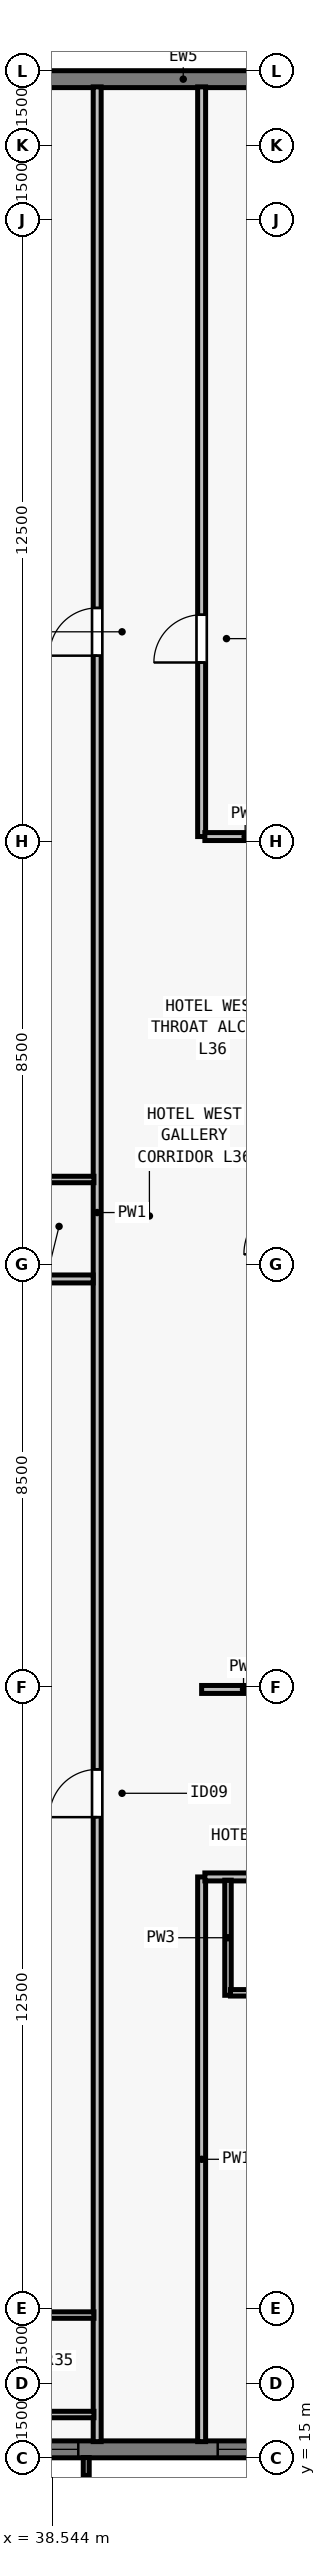
"""IFC4 building model, lengths in metres.
Left out: names, types, materials, properties, quantities, classifications, styles, units other than length and angle.
Written with IfcOpenShell. Run it as: python <this file> out.ifc"""

import sys

from ifc_helpers import new_model, si_unit, direction, frame, frame_2d, origin, place, context, subcontext, project, spatial, rectangle, extrude, element, fill, save


model = new_model("IFC4")
c1 = context("Model", 3, precision=1e-05, world=origin(), true_north=direction((0.0, 1.0)))
c2 = subcontext(c1, "Body", "Model", "MODEL_VIEW")
j1 = project(units=[si_unit("LENGTHUNIT", "METRE"), si_unit("PLANEANGLEUNIT", "RADIAN")], contexts=[c1])
p1 = place(None, origin())
s1 = spatial("IfcSite", under=j1, at=p1, CompositionType="ELEMENT")
p2 = place(p1, origin())
s2 = spatial("IfcBuilding", under=s1, at=p2, CompositionType="ELEMENT")
p3 = place(p2, frame((0.0, 0.0, 134.0)))
s3 = spatial("IfcBuildingStorey", under=s2, at=p3, CompositionType="ELEMENT", Elevation=134.0)
p4 = place(p3, frame((32.0, 62.83, 0.0), z_axis=(0.0, 0.0, 1.0), x_axis=(1.0, 0.0, 0.0)))
e1 = element("IfcWall", 1, at=p4, inside=s3, PredefinedType="SOLIDWALL", context=c2, shape_type="SweptSolid", body=[
    extrude(rectangle(XDim=39.682, YDim=0.34, at=frame_2d((19.841, 0.0))), origin(), (0.0, 0.0, 1.0), 3.28),
])
p5 = place(p4, frame((4.952, 0.0, 0.8)))
e2 = element("IfcOpeningElement", 2, at=p5, cuts=e1, PredefinedType="OPENING", context=c2, shape_type="SweptSolid", body=[
    extrude(rectangle(XDim=1.35, YDim=1.66, at=frame_2d((0.675, 0.83))), frame((0.0, 0.18, 0.0), z_axis=(0.0, -1.0, 0.0), x_axis=(1.0, 0.0, 0.0)), (0.0, 0.0, 1.0), 0.36),
])
p6 = place(p4, frame((12.059, 0.0, 0.8)))
e3 = element("IfcOpeningElement", 3, at=p6, cuts=e1, PredefinedType="OPENING", context=c2, shape_type="SweptSolid", body=[
    extrude(rectangle(XDim=1.35, YDim=1.66, at=frame_2d((0.675, 0.83))), frame((0.0, 0.18, 0.0), z_axis=(0.0, -1.0, 0.0), x_axis=(1.0, 0.0, 0.0)), (0.0, 0.0, 1.0), 0.36),
])
p7 = place(p4, frame((16.262, 0.0, 0.8)))
e4 = element("IfcOpeningElement", 4, at=p7, cuts=e1, PredefinedType="OPENING", context=c2, shape_type="SweptSolid", body=[
    extrude(rectangle(XDim=1.75, YDim=1.66, at=frame_2d((0.875, 0.83))), frame((0.0, 0.18, 0.0), z_axis=(0.0, -1.0, 0.0), x_axis=(1.0, 0.0, 0.0)), (0.0, 0.0, 1.0), 0.36),
])
p8 = place(p4, frame((19.166, 0.0, 0.8)))
e5 = element("IfcOpeningElement", 5, at=p8, cuts=e1, PredefinedType="OPENING", context=c2, shape_type="SweptSolid", body=[
    extrude(rectangle(XDim=1.35, YDim=1.66, at=frame_2d((0.675, 0.83))), frame((0.0, 0.18, 0.0), z_axis=(0.0, -1.0, 0.0), x_axis=(1.0, 0.0, 0.0)), (0.0, 0.0, 1.0), 0.36),
])
p9 = place(p4, frame((22.07, 0.0, 0.8)))
e6 = element("IfcOpeningElement", 6, at=p9, cuts=e1, PredefinedType="OPENING", context=c2, shape_type="SweptSolid", body=[
    extrude(rectangle(XDim=1.75, YDim=1.66, at=frame_2d((0.875, 0.83))), frame((0.0, 0.18, 0.0), z_axis=(0.0, -1.0, 0.0), x_axis=(1.0, 0.0, 0.0)), (0.0, 0.0, 1.0), 0.36),
])
p10 = place(p4, frame((26.273, 0.0, 0.8)))
e7 = element("IfcOpeningElement", 7, at=p10, cuts=e1, PredefinedType="OPENING", context=c2, shape_type="SweptSolid", body=[
    extrude(rectangle(XDim=1.35, YDim=1.66, at=frame_2d((0.675, 0.83))), frame((0.0, 0.18, 0.0), z_axis=(0.0, -1.0, 0.0), x_axis=(1.0, 0.0, 0.0)), (0.0, 0.0, 1.0), 0.36),
])
p11 = place(p4, frame((29.627, 0.0, 0.8)))
e8 = element("IfcOpeningElement", 8, at=p11, cuts=e1, PredefinedType="OPENING", context=c2, shape_type="SweptSolid", body=[
    extrude(rectangle(XDim=1.75, YDim=1.66, at=frame_2d((0.875, 0.83))), frame((0.0, 0.18, 0.0), z_axis=(0.0, -1.0, 0.0), x_axis=(1.0, 0.0, 0.0)), (0.0, 0.0, 1.0), 0.36),
])
p12 = place(p4, frame((34.23, 0.0, 0.8)))
e9 = element("IfcOpeningElement", 9, at=p12, cuts=e1, PredefinedType="OPENING", context=c2, shape_type="SweptSolid", body=[
    extrude(rectangle(XDim=1.35, YDim=1.66, at=frame_2d((0.675, 0.83))), frame((0.0, 0.18, 0.0), z_axis=(0.0, -1.0, 0.0), x_axis=(1.0, 0.0, 0.0)), (0.0, 0.0, 1.0), 0.36),
])
p13 = place(p3, frame((72.0, 15.17, 0.0), z_axis=(0.0, 0.0, 1.0), x_axis=(-1.0, 0.0, 0.0)))
e10 = element("IfcWall", 10, at=p13, inside=s3, PredefinedType="SOLIDWALL", context=c2, shape_type="SweptSolid", body=[
    extrude(rectangle(XDim=39.682, YDim=0.34, at=frame_2d((19.841, 0.0))), origin(), (0.0, 0.0, 1.0), 3.28),
])
p14 = place(p13, frame((8.755, 0.0, 0.8)))
e11 = element("IfcOpeningElement", 11, at=p14, cuts=e10, PredefinedType="OPENING", context=c2, shape_type="SweptSolid", body=[
    extrude(rectangle(XDim=1.75, YDim=1.66, at=frame_2d((0.875, 0.83))), frame((0.0, 0.18, 0.0), z_axis=(0.0, -1.0, 0.0), x_axis=(1.0, 0.0, 0.0)), (0.0, 0.0, 1.0), 0.36),
])
p15 = place(p13, frame((12.059, 0.0, 0.8)))
e12 = element("IfcOpeningElement", 12, at=p15, cuts=e10, PredefinedType="OPENING", context=c2, shape_type="SweptSolid", body=[
    extrude(rectangle(XDim=1.35, YDim=1.66, at=frame_2d((0.675, 0.83))), frame((0.0, 0.18, 0.0), z_axis=(0.0, -1.0, 0.0), x_axis=(1.0, 0.0, 0.0)), (0.0, 0.0, 1.0), 0.36),
])
p16 = place(p13, frame((16.262, 0.0, 0.8)))
e13 = element("IfcOpeningElement", 13, at=p16, cuts=e10, PredefinedType="OPENING", context=c2, shape_type="SweptSolid", body=[
    extrude(rectangle(XDim=1.75, YDim=1.66, at=frame_2d((0.875, 0.83))), frame((0.0, 0.18, 0.0), z_axis=(0.0, -1.0, 0.0), x_axis=(1.0, 0.0, 0.0)), (0.0, 0.0, 1.0), 0.36),
])
p17 = place(p13, frame((19.166, 0.0, 0.8)))
e14 = element("IfcOpeningElement", 14, at=p17, cuts=e10, PredefinedType="OPENING", context=c2, shape_type="SweptSolid", body=[
    extrude(rectangle(XDim=1.35, YDim=1.66, at=frame_2d((0.675, 0.83))), frame((0.0, 0.18, 0.0), z_axis=(0.0, -1.0, 0.0), x_axis=(1.0, 0.0, 0.0)), (0.0, 0.0, 1.0), 0.36),
])
p18 = place(p13, frame((21.27, 0.0, 0.8)))
e15 = element("IfcOpeningElement", 15, at=p18, cuts=e10, PredefinedType="OPENING", context=c2, shape_type="SweptSolid", body=[
    extrude(rectangle(XDim=1.75, YDim=1.66, at=frame_2d((0.875, 0.83))), frame((0.0, 0.18, 0.0), z_axis=(0.0, -1.0, 0.0), x_axis=(1.0, 0.0, 0.0)), (0.0, 0.0, 1.0), 0.36),
])
p19 = place(p13, frame((26.273, 0.0, 0.8)))
e16 = element("IfcOpeningElement", 16, at=p19, cuts=e10, PredefinedType="OPENING", context=c2, shape_type="SweptSolid", body=[
    extrude(rectangle(XDim=1.35, YDim=1.66, at=frame_2d((0.675, 0.83))), frame((0.0, 0.18, 0.0), z_axis=(0.0, -1.0, 0.0), x_axis=(1.0, 0.0, 0.0)), (0.0, 0.0, 1.0), 0.36),
])
p20 = place(p13, frame((28.377, 0.0, 0.8)))
e17 = element("IfcOpeningElement", 17, at=p20, cuts=e10, PredefinedType="OPENING", context=c2, shape_type="SweptSolid", body=[
    extrude(rectangle(XDim=1.75, YDim=1.66, at=frame_2d((0.875, 0.83))), frame((0.0, 0.18, 0.0), z_axis=(0.0, -1.0, 0.0), x_axis=(1.0, 0.0, 0.0)), (0.0, 0.0, 1.0), 0.36),
])
p21 = place(p13, frame((32.93, 0.0, 0.8)))
e18 = element("IfcOpeningElement", 18, at=p21, cuts=e10, PredefinedType="OPENING", context=c2, shape_type="SweptSolid", body=[
    extrude(rectangle(XDim=1.35, YDim=1.66, at=frame_2d((0.675, 0.83))), frame((0.0, 0.18, 0.0), z_axis=(0.0, -1.0, 0.0), x_axis=(1.0, 0.0, 0.0)), (0.0, 0.0, 1.0), 0.36),
])
p22 = place(p3, frame((39.45, 15.325, 0.0), z_axis=(0.0, 0.0, 1.0), x_axis=(0.0, 1.0, 0.0)))
e19 = element("IfcWall", 19, at=p22, inside=s3, PredefinedType="PARTITIONING", context=c2, shape_type="SweptSolid", body=[
    extrude(rectangle(XDim=47.35, YDim=0.16, at=frame_2d((23.675, 0.0))), origin(), (0.0, 0.0, 1.0), 2.555),
])
p23 = place(p22, frame((12.557, 0.0, 0.0)))
e20 = element("IfcOpeningElement", 20, at=p23, cuts=e19, PredefinedType="OPENING", context=c2, shape_type="SweptSolid", body=[
    extrude(rectangle(XDim=0.96, YDim=2.15, at=frame_2d((0.48, 1.075))), frame((0.0, 0.09, 0.0), z_axis=(0.0, -1.0, 0.0), x_axis=(1.0, 0.0, 0.0)), (0.0, 0.0, 1.0), 0.18),
])
p24 = place(p22, frame((35.912, 0.0, 0.0)))
e21 = element("IfcOpeningElement", 21, at=p24, cuts=e19, PredefinedType="OPENING", context=c2, shape_type="SweptSolid", body=[
    extrude(rectangle(XDim=0.96, YDim=2.15, at=frame_2d((0.48, 1.075))), frame((0.0, 0.09, 0.0), z_axis=(0.0, -1.0, 0.0), x_axis=(1.0, 0.0, 0.0)), (0.0, 0.0, 1.0), 0.18),
])
p25 = place(p3, frame((41.55, 15.325, 0.0), z_axis=(0.0, 0.0, 1.0), x_axis=(0.0, 1.0, 0.0)))
e22 = element("IfcWall", 22, at=p25, inside=s3, PredefinedType="PARTITIONING", context=c2, shape_type="SweptSolid", body=[
    extrude(rectangle(XDim=11.355, YDim=0.16, at=frame_2d((5.677, 0.0))), origin(), (0.0, 0.0, 1.0), 3.28),
])
p26 = place(p3, frame((41.55, 47.6, 0.0), z_axis=(0.0, 0.0, 1.0), x_axis=(0.0, 1.0, 0.0)))
e23 = element("IfcWall", 23, at=p26, inside=s3, PredefinedType="PARTITIONING", context=c2, shape_type="SweptSolid", body=[
    extrude(rectangle(XDim=15.075, YDim=0.16, at=frame_2d((7.538, 0.0))), origin(), (0.0, 0.0, 1.0), 2.555),
])
p27 = place(p26, frame((3.5, 0.0, 0.0)))
e24 = element("IfcOpeningElement", 24, at=p27, cuts=e23, PredefinedType="OPENING", context=c2, shape_type="SweptSolid", body=[
    extrude(rectangle(XDim=0.96, YDim=2.12, at=frame_2d((0.48, 1.06))), frame((0.0, 0.09, 0.0), z_axis=(0.0, -1.0, 0.0), x_axis=(1.0, 0.0, 0.0)), (0.0, 0.0, 1.0), 0.18),
])
p28 = place(p3, frame((41.55, 30.45, 0.0), z_axis=(0.0, 0.0, 1.0), x_axis=(1.0, 0.0, 0.0)))
e25 = element("IfcWall", 25, at=p28, inside=s3, PredefinedType="PARTITIONING", context=c2, shape_type="SweptSolid", body=[
    extrude(rectangle(XDim=1.685, YDim=0.16, at=frame_2d((0.843, 0.0))), origin(), (0.0, 0.0, 1.0), 3.28),
])
p29 = place(p3, frame((41.615, 47.6, 0.0), z_axis=(0.0, 0.0, 1.0), x_axis=(1.0, 0.0, 0.0)))
e26 = element("IfcWall", 26, at=p29, inside=s3, PredefinedType="PARTITIONING", context=c2, shape_type="SweptSolid", body=[
    extrude(rectangle(XDim=1.62, YDim=0.16, at=frame_2d((0.81, 0.0))), origin(), (0.0, 0.0, 1.0), 3.28),
])
p30 = place(p3, frame((41.615, 26.68, 0.0), z_axis=(0.0, 0.0, 1.0), x_axis=(1.0, 0.0, 0.0)))
e27 = element("IfcWall", 27, at=p30, inside=s3, PredefinedType="PARTITIONING", context=c2, shape_type="SweptSolid", body=[
    extrude(rectangle(XDim=22.07, YDim=0.16, at=frame_2d((11.035, 0.0))), origin(), (0.0, 0.0, 1.0), 3.28),
])
p31 = place(p30, frame((4.281, 0.0, 0.0)))
e28 = element("IfcOpeningElement", 28, at=p31, cuts=e27, PredefinedType="OPENING", context=c2, shape_type="SweptSolid", body=[
    extrude(rectangle(XDim=0.96, YDim=2.15, at=frame_2d((0.48, 1.075))), frame((0.0, 0.09, 0.0), z_axis=(0.0, -1.0, 0.0), x_axis=(1.0, 0.0, 0.0)), (0.0, 0.0, 1.0), 0.18),
])
p32 = place(p30, frame((11.56, 0.0, 0.0)))
e29 = element("IfcOpeningElement", 29, at=p32, cuts=e27, PredefinedType="OPENING", context=c2, shape_type="SweptSolid", body=[
    extrude(rectangle(XDim=0.96, YDim=2.15, at=frame_2d((0.48, 1.075))), frame((0.0, 0.09, 0.0), z_axis=(0.0, -1.0, 0.0), x_axis=(1.0, 0.0, 0.0)), (0.0, 0.0, 1.0), 0.18),
])
p33 = place(p30, frame((19.134, 0.0, 0.0)))
e30 = element("IfcOpeningElement", 30, at=p33, cuts=e27, PredefinedType="OPENING", context=c2, shape_type="SweptSolid", body=[
    extrude(rectangle(XDim=0.96, YDim=2.15, at=frame_2d((0.48, 1.075))), frame((0.0, 0.09, 0.0), z_axis=(0.0, -1.0, 0.0), x_axis=(1.0, 0.0, 0.0)), (0.0, 0.0, 1.0), 0.18),
])
p34 = place(p3, frame((42.08, 24.3, 0.0), z_axis=(0.0, 0.0, 1.0), x_axis=(0.0, 1.0, 0.0)))
e31 = element("IfcWall", 31, at=p34, inside=s3, PredefinedType="PLUMBINGWALL", context=c2, shape_type="SweptSolid", body=[
    extrude(rectangle(XDim=2.315, YDim=0.13, at=frame_2d((1.157, 0.0))), origin(), (0.0, 0.0, 1.0), 3.28),
])
p35 = place(p3, frame((42.13, 24.35, 0.0), z_axis=(0.0, 0.0, 1.0), x_axis=(1.0, 0.0, 0.0)))
e32 = element("IfcWall", 32, at=p35, inside=s3, PredefinedType="PLUMBINGWALL", context=c2, shape_type="SweptSolid", body=[
    extrude(rectangle(XDim=1.9, YDim=0.13, at=frame_2d((0.95, 0.0))), origin(), (0.0, 0.0, 1.0), 3.28),
])
p36 = place(p35, frame((0.54, 0.0, 0.0)))
e33 = element("IfcOpeningElement", 33, at=p36, cuts=e32, PredefinedType="OPENING", context=c2, shape_type="SweptSolid", body=[
    extrude(rectangle(XDim=0.82, YDim=2.1, at=frame_2d((0.41, 1.05))), frame((0.0, 0.075, 0.0), z_axis=(0.0, -1.0, 0.0), x_axis=(1.0, 0.0, 0.0)), (0.0, 0.0, 1.0), 0.15),
])
for number, where, z_axis, x_axis in (
    (34, (37.07, 15.87, 0.0), (0.0, 0.0, 1.0), (1.0, 0.0, 0.0)),
    (35, (37.07, 17.87, 0.0), (0.0, 0.0, 1.0), (1.0, 0.0, 0.0)),
):
    element("IfcWall", number, at=place(p3, frame(where, z_axis=z_axis, x_axis=x_axis)), inside=s3, PredefinedType="PLUMBINGWALL", context=c2, shape_type="SweptSolid", body=[
        extrude(rectangle(XDim=2.315, YDim=0.13, at=frame_2d((1.157, 0.0))), origin(), (0.0, 0.0, 1.0), 3.28),
    ])
p37 = place(p3, frame((28.325, 38.704, 0.0), z_axis=(0.0, 0.0, 1.0), x_axis=(1.0, 0.0, 0.0)))
e36 = element("IfcWall", 36, at=p37, inside=s3, PredefinedType="PARTITIONING", context=c2, shape_type="SweptSolid", body=[
    extrude(rectangle(XDim=11.045, YDim=0.16, at=frame_2d((5.522, 0.0))), origin(), (0.0, 0.0, 1.0), 2.896),
])
p38 = place(p3, frame((37.07, 40.704, 0.0), z_axis=(0.0, 0.0, 1.0), x_axis=(1.0, 0.0, 0.0)))
e37 = element("IfcWall", 37, at=p38, inside=s3, PredefinedType="PLUMBINGWALL", context=c2, shape_type="SweptSolid", body=[
    extrude(rectangle(XDim=2.315, YDim=0.13, at=frame_2d((1.157, 0.0))), origin(), (0.0, 0.0, 1.0), 3.28),
])
p39 = place(p20, origin())
e38 = element("IfcWindow", 38, at=p39, inside=s3, PartitioningType="SINGLE_PANEL", PredefinedType="WINDOW", context=c2, shape_type="SweptSolid", body=[
    extrude(rectangle(XDim=1.75, YDim=1.66, at=frame_2d((0.875, 0.83))), frame((0.0, -0.05, 0.0), z_axis=(0.0, -1.0, 0.0), x_axis=(1.0, 0.0, 0.0)), (0.0, 0.0, 1.0), 0.06),
])
fill(e17, e38)
p40 = place(p21, origin())
e39 = element("IfcWindow", 39, at=p40, inside=s3, PartitioningType="SINGLE_PANEL", PredefinedType="WINDOW", context=c2, shape_type="SweptSolid", body=[
    extrude(rectangle(XDim=1.35, YDim=1.66, at=frame_2d((0.675, 0.83))), frame((0.0, -0.05, 0.0), z_axis=(0.0, -1.0, 0.0), x_axis=(1.0, 0.0, 0.0)), (0.0, 0.0, 1.0), 0.06),
])
fill(e18, e39)
p41 = place(p27, origin())
e40 = element("IfcDoor", 40, at=p41, inside=s3, OperationType="SINGLE_SWING_LEFT", PredefinedType="DOOR", context=c2, shape_type="SweptSolid", body=[
    extrude(rectangle(XDim=0.96, YDim=2.12, at=frame_2d((0.48, 1.06))), frame((0.0, 0.025, 0.0), z_axis=(0.0, -1.0, 0.0), x_axis=(1.0, 0.0, 0.0)), (0.0, 0.0, 1.0), 0.05),
])
fill(e24, e40)
p42 = place(p23, origin())
e41 = element("IfcDoor", 41, at=p42, inside=s3, OperationType="SINGLE_SWING_LEFT", PredefinedType="DOOR", context=c2, shape_type="SweptSolid", body=[
    extrude(rectangle(XDim=0.96, YDim=2.15, at=frame_2d((0.48, 1.075))), frame((0.0, 0.025, 0.0), z_axis=(0.0, -1.0, 0.0), x_axis=(1.0, 0.0, 0.0)), (0.0, 0.0, 1.0), 0.05),
])
fill(e20, e41)
p43 = place(p24, origin())
e42 = element("IfcDoor", 42, at=p43, inside=s3, OperationType="SINGLE_SWING_LEFT", PredefinedType="DOOR", context=c2, shape_type="SweptSolid", body=[
    extrude(rectangle(XDim=0.96, YDim=2.15, at=frame_2d((0.48, 1.075))), frame((0.0, 0.025, 0.0), z_axis=(0.0, -1.0, 0.0), x_axis=(1.0, 0.0, 0.0)), (0.0, 0.0, 1.0), 0.05),
])
fill(e21, e42)
save(model, sys.argv[1])
